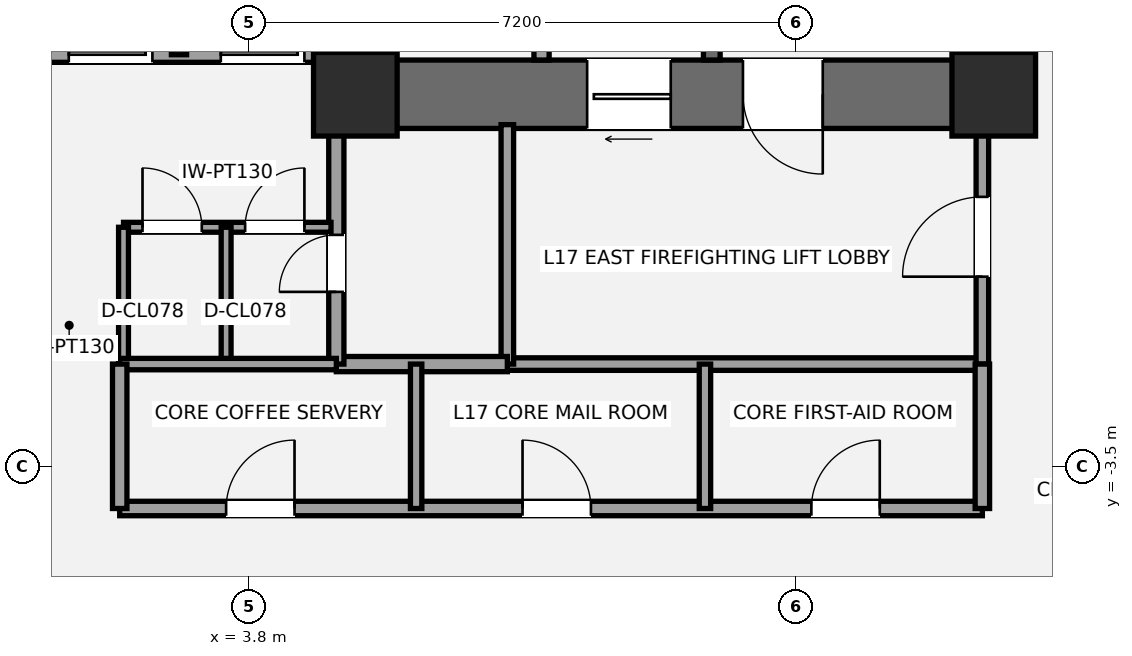
"""IFC4 building model, lengths in metres.
Left out: names, types, materials, properties, quantities, classifications, styles, units other than length and angle.
Written with IfcOpenShell. Run it as: python <this file> out.ifc"""

import sys

from ifc_helpers import new_model, si_unit, direction, frame, frame_2d, origin, origin_2d, place, context, subcontext, project, spatial, rectangle, extrude, element, fill, save


model = new_model("IFC4")
c1 = context("Model", 3, precision=1e-05, world=origin(), true_north=direction((0.0, 1.0)))
c2 = subcontext(c1, "Body", "Model", "MODEL_VIEW")
j1 = project(units=[si_unit("LENGTHUNIT", "METRE"), si_unit("PLANEANGLEUNIT", "RADIAN")], contexts=[c1])
p1 = place(None, origin())
s1 = spatial("IfcSite", under=j1, at=p1, CompositionType="ELEMENT")
p2 = place(p1, origin())
s2 = spatial("IfcBuilding", under=s1, at=p2, CompositionType="ELEMENT")
p3 = place(p2, frame((0.0, 0.0, 66.6)))
s3 = spatial("IfcBuildingStorey", under=s2, at=p3, CompositionType="ELEMENT", Elevation=66.6)
p4 = place(p3, frame((13.6, 0.95, 0.0), z_axis=(0.0, 0.0, 1.0), x_axis=(0.0, 1.0, 0.0)))
e1 = element("IfcWall", 1, at=p4, inside=s3, PredefinedType="SHEAR", context=c2, shape_type="SweptSolid", body=[
    extrude(rectangle(XDim=8.95, YDim=0.9, at=frame_2d((4.475, 0.0))), origin(), (0.0, 0.0, 1.0), 3.6),
])
p5 = place(p3, frame((14.05, 1.4, 0.0), z_axis=(0.0, 0.0, 1.0), x_axis=(-1.0, 0.0, 0.0)))
e2 = element("IfcWall", 2, at=p5, inside=s3, PredefinedType="SHEAR", context=c2, shape_type="SweptSolid", body=[
    extrude(rectangle(XDim=9.3, YDim=0.9, at=frame_2d((4.65, 0.0))), origin(), (0.0, 0.0, 1.0), 3.6),
])
p6 = place(p5, frame((2.7, 0.0, 0.0)))
e3 = element("IfcOpeningElement", 3, at=p6, cuts=e2, PredefinedType="OPENING", context=c2, shape_type="SweptSolid", body=[
    extrude(rectangle(XDim=1.05, YDim=2.15, at=frame_2d((0.525, 1.075))), frame((0.0, 0.46, 0.0), z_axis=(0.0, -1.0, 0.0), x_axis=(1.0, 0.0, 0.0)), (0.0, 0.0, 1.0), 0.92),
])
p7 = place(p5, frame((4.7, 0.0, 0.0)))
e4 = element("IfcOpeningElement", 4, at=p7, cuts=e2, PredefinedType="OPENING", context=c2, shape_type="SweptSolid", body=[
    extrude(rectangle(XDim=1.1, YDim=2.2, at=frame_2d((0.55, 1.1))), frame((0.0, 0.46, 0.0), z_axis=(0.0, -1.0, 0.0), x_axis=(1.0, 0.0, 0.0)), (0.0, 0.0, 1.0), 0.92),
])
p8 = place(p3, frame((5.2, 0.95, 0.0), z_axis=(0.0, 0.0, 1.0), x_axis=(0.0, 1.0, 0.0)))
e5 = element("IfcWall", 5, at=p8, inside=s3, PredefinedType="SHEAR", context=c2, shape_type="SweptSolid", body=[
    extrude(rectangle(XDim=2.85, YDim=0.9, at=frame_2d((1.425, 0.0))), origin(), (0.0, 0.0, 1.0), 3.6),
])
p9 = place(p3, frame((9.89, 1.85, 0.0), z_axis=(0.0, 0.0, 1.0), x_axis=(0.0, 1.0, 0.0)))
e6 = element("IfcWall", 6, at=p9, inside=s3, PredefinedType="SHEAR", context=c2, shape_type="SweptSolid", body=[
    extrude(rectangle(XDim=7.15, YDim=0.22, at=frame_2d((3.575, 0.0))), origin(), (0.0, 0.0, 1.0), 3.6),
])
for number, where, z_axis, x_axis in (
    (7, (5.2, 1.4, 0.0), (0.0, 0.0, 1.0), (1.0, 0.0, 0.0)),
    (8, (13.6, 1.4, 0.0), (0.0, 0.0, 1.0), (1.0, 0.0, 0.0)),
):
    element("IfcColumn", number, at=place(p3, frame(where, z_axis=z_axis, x_axis=x_axis)), inside=s3, PredefinedType="COLUMN", context=c2, shape_type="SweptSolid", body=[
        extrude(rectangle(XDim=1.1, YDim=1.1, at=origin_2d()), origin(), (0.0, 0.0, 1.0), 3.6),
    ])
p10 = place(p3, frame((7.2, -2.15, 0.0), z_axis=(0.0, 0.0, 1.0), x_axis=(1.0, 0.0, 0.0)))
e9 = element("IfcWall", 9, at=p10, inside=s3, PredefinedType="PARTITIONING", context=c2, shape_type="SweptSolid", body=[
    extrude(rectangle(XDim=6.25, YDim=0.165, at=frame_2d((3.125, 0.0))), origin(), (0.0, 0.0, 1.0), 3.4),
])
p11 = place(p3, frame((7.2, -2.15, 0.0), z_axis=(0.0, 0.0, 1.0), x_axis=(0.0, 1.0, 0.0)))
e10 = element("IfcWall", 10, at=p11, inside=s3, PredefinedType="PARTITIONING", context=c2, shape_type="SweptSolid", body=[
    extrude(rectangle(XDim=3.15, YDim=0.165, at=frame_2d((1.575, 0.0))), origin(), (0.0, 0.0, 1.0), 2.853),
])
p12 = place(p3, frame((13.45, -2.15, 0.0), z_axis=(0.0, 0.0, 1.0), x_axis=(0.0, 1.0, 0.0)))
e11 = element("IfcWall", 11, at=p12, inside=s3, PredefinedType="PARTITIONING", context=c2, shape_type="SweptSolid", body=[
    extrude(rectangle(XDim=3.15, YDim=0.165, at=frame_2d((1.575, 0.0))), origin(), (0.0, 0.0, 1.0), 2.853),
])
p13 = place(p12, frame((1.15, 0.0, 0.0)))
e12 = element("IfcOpeningElement", 12, at=p13, cuts=e11, PredefinedType="OPENING", context=c2, shape_type="SweptSolid", body=[
    extrude(rectangle(XDim=1.05, YDim=2.15, at=frame_2d((0.525, 1.075))), frame((0.0, 0.093, 0.0), z_axis=(0.0, -1.0, 0.0), x_axis=(1.0, 0.0, 0.0)), (0.0, 0.0, 1.0), 0.185),
])
p14 = place(p3, frame((4.95, -2.15, 0.0), z_axis=(0.0, 0.0, 1.0), x_axis=(1.0, 0.0, 0.0)))
e13 = element("IfcWall", 13, at=p14, inside=s3, PredefinedType="SOLIDWALL", context=c2, shape_type="SweptSolid", body=[
    extrude(rectangle(XDim=2.25, YDim=0.2, at=frame_2d((1.125, 0.0))), origin(), (0.0, 0.0, 1.0), 3.4),
])
p15 = place(p3, frame((4.95, -2.15, 0.0), z_axis=(0.0, 0.0, 1.0), x_axis=(0.0, 1.0, 0.0)))
e14 = element("IfcWall", 14, at=p15, inside=s3, PredefinedType="SOLIDWALL", context=c2, shape_type="SweptSolid", body=[
    extrude(rectangle(XDim=3.15, YDim=0.2, at=frame_2d((1.575, 0.0))), origin(), (0.0, 0.0, 1.0), 2.853),
])
p16 = place(p15, frame((0.95, 0.0, 0.0)))
e15 = element("IfcOpeningElement", 15, at=p16, cuts=e14, PredefinedType="OPENING", context=c2, shape_type="SweptSolid", body=[
    extrude(rectangle(XDim=0.75, YDim=2.1, at=frame_2d((0.375, 1.05))), frame((0.0, 0.11, 0.0), z_axis=(0.0, -1.0, 0.0), x_axis=(1.0, 0.0, 0.0)), (0.0, 0.0, 1.0), 0.22),
])
p17 = place(p3, frame((2.15, -0.35, 0.0), z_axis=(0.0, 0.0, 1.0), x_axis=(1.0, 0.0, 0.0)))
e16 = element("IfcWall", 16, at=p17, inside=s3, PredefinedType="PARTITIONING", context=c2, shape_type="SweptSolid", body=[
    extrude(rectangle(XDim=2.73, YDim=0.13, at=frame_2d((1.365, 0.0))), origin(), (0.0, 0.0, 1.0), 3.4),
])
p18 = place(p17, frame((0.25, 0.0, 0.0)))
e17 = element("IfcOpeningElement", 17, at=p18, cuts=e16, PredefinedType="OPENING", context=c2, shape_type="SweptSolid", body=[
    extrude(rectangle(XDim=0.78, YDim=2.1, at=frame_2d((0.39, 1.05))), frame((0.0, 0.075, 0.0), z_axis=(0.0, -1.0, 0.0), x_axis=(1.0, 0.0, 0.0)), (0.0, 0.0, 1.0), 0.15),
])
p19 = place(p17, frame((1.6, 0.0, 0.0)))
e18 = element("IfcOpeningElement", 18, at=p19, cuts=e16, PredefinedType="OPENING", context=c2, shape_type="SweptSolid", body=[
    extrude(rectangle(XDim=0.78, YDim=2.1, at=frame_2d((0.39, 1.05))), frame((0.0, 0.075, 0.0), z_axis=(0.0, -1.0, 0.0), x_axis=(1.0, 0.0, 0.0)), (0.0, 0.0, 1.0), 0.15),
])
for number, where, z_axis, x_axis in (
    (19, (2.15, -2.15, 0.0), (0.0, 0.0, 1.0), (0.0, 1.0, 0.0)),
    (20, (3.5, -2.15, 0.0), (0.0, 0.0, 1.0), (0.0, 1.0, 0.0)),
):
    element("IfcWall", number, at=place(p3, frame(where, z_axis=z_axis, x_axis=x_axis)), inside=s3, PredefinedType="PARTITIONING", context=c2, shape_type="SweptSolid", body=[
        extrude(rectangle(XDim=1.8, YDim=0.13, at=frame_2d((0.9, 0.0))), origin(), (0.0, 0.0, 1.0), 3.4),
    ])
p20 = place(p3, frame((7.65, 1.85, 0.0), z_axis=(0.0, 0.0, 1.0), x_axis=(0.0, 1.0, 0.0)))
e21 = element("IfcWall", 21, at=p20, inside=s3, PredefinedType="SOLIDWALL", context=c2, shape_type="SweptSolid", body=[
    extrude(rectangle(XDim=1.97, YDim=0.2, at=frame_2d((0.985, 0.0))), origin(), (0.0, 0.0, 1.0), 3.4),
])
p21 = place(p3, frame((0.88, 1.92, 0.0), z_axis=(0.0, 0.0, 1.0), x_axis=(1.0, 0.0, 0.0)))
e22 = element("IfcWall", 22, at=p21, inside=s3, PredefinedType="SOLIDWALL", context=c2, shape_type="SweptSolid", body=[
    extrude(rectangle(XDim=3.86, YDim=0.2, at=frame_2d((1.93, 0.0))), origin(), (0.0, 0.0, 1.0), 2.39),
])
p22 = place(p21, frame((0.55, 0.0, 0.0)))
e23 = element("IfcOpeningElement", 23, at=p22, cuts=e22, PredefinedType="OPENING", context=c2, shape_type="SweptSolid", body=[
    extrude(rectangle(XDim=1.1, YDim=2.2, at=frame_2d((0.55, 1.1))), frame((0.0, 0.11, 0.0), z_axis=(0.0, -1.0, 0.0), x_axis=(1.0, 0.0, 0.0)), (0.0, 0.0, 1.0), 0.22),
])
p23 = place(p21, frame((2.55, 0.0, 0.0)))
e24 = element("IfcOpeningElement", 24, at=p23, cuts=e22, PredefinedType="OPENING", context=c2, shape_type="SweptSolid", body=[
    extrude(rectangle(XDim=1.1, YDim=2.2, at=frame_2d((0.55, 1.1))), frame((0.0, 0.11, 0.0), z_axis=(0.0, -1.0, 0.0), x_axis=(1.0, 0.0, 0.0)), (0.0, 0.0, 1.0), 0.22),
])
p24 = place(p3, frame((2.88, 1.92, 0.0), z_axis=(0.0, 0.0, 1.0), x_axis=(0.0, 1.0, 0.0)))
e25 = element("IfcWall", 25, at=p24, inside=s3, PredefinedType="SOLIDWALL", context=c2, shape_type="SweptSolid", body=[
    extrude(rectangle(XDim=1.82, YDim=0.2, at=frame_2d((0.91, 0.0))), origin(), (0.0, 0.0, 1.0), 3.4),
])
p25 = place(p3, frame((2.1, -4.05, 0.0), z_axis=(0.0, 0.0, 1.0), x_axis=(1.0, 0.0, 0.0)))
e26 = element("IfcWall", 26, at=p25, inside=s3, PredefinedType="PLUMBINGWALL", context=c2, shape_type="SweptSolid", body=[
    extrude(rectangle(XDim=11.35, YDim=0.19, at=frame_2d((5.675, 0.0))), origin(), (0.0, 0.0, 1.0), 2.933),
])
p26 = place(p25, frame((1.4, 0.0, 0.0)))
e27 = element("IfcOpeningElement", 27, at=p26, cuts=e26, PredefinedType="OPENING", context=c2, shape_type="SweptSolid", body=[
    extrude(rectangle(XDim=0.9, YDim=2.1, at=frame_2d((0.45, 1.05))), frame((0.0, 0.105, 0.0), z_axis=(0.0, -1.0, 0.0), x_axis=(1.0, 0.0, 0.0)), (0.0, 0.0, 1.0), 0.21),
])
p27 = place(p25, frame((5.3, 0.0, 0.0)))
e28 = element("IfcOpeningElement", 28, at=p27, cuts=e26, PredefinedType="OPENING", context=c2, shape_type="SweptSolid", body=[
    extrude(rectangle(XDim=0.9, YDim=2.1, at=frame_2d((0.45, 1.05))), frame((0.0, 0.105, 0.0), z_axis=(0.0, -1.0, 0.0), x_axis=(1.0, 0.0, 0.0)), (0.0, 0.0, 1.0), 0.21),
])
p28 = place(p25, frame((9.1, 0.0, 0.0)))
e29 = element("IfcOpeningElement", 29, at=p28, cuts=e26, PredefinedType="OPENING", context=c2, shape_type="SweptSolid", body=[
    extrude(rectangle(XDim=0.9, YDim=2.1, at=frame_2d((0.45, 1.05))), frame((0.0, 0.105, 0.0), z_axis=(0.0, -1.0, 0.0), x_axis=(1.0, 0.0, 0.0)), (0.0, 0.0, 1.0), 0.21),
])
p29 = place(p3, frame((2.1, -2.15, 0.0), z_axis=(0.0, 0.0, 1.0), x_axis=(1.0, 0.0, 0.0)))
e30 = element("IfcWall", 30, at=p29, inside=s3, PredefinedType="PLUMBINGWALL", context=c2, shape_type="SweptSolid", body=[
    extrude(rectangle(XDim=2.85, YDim=0.15, at=frame_2d((1.425, 0.0))), origin(), (0.0, 0.0, 1.0), 3.4),
])
p30 = place(p3, frame((2.1, -4.05, 0.0), z_axis=(0.0, 0.0, 1.0), x_axis=(0.0, 1.0, 0.0)))
e31 = element("IfcWall", 31, at=p30, inside=s3, PredefinedType="PLUMBINGWALL", context=c2, shape_type="SweptSolid", body=[
    extrude(rectangle(XDim=1.9, YDim=0.19, at=frame_2d((0.95, 0.0))), origin(), (0.0, 0.0, 1.0), 3.4),
])
p31 = place(p3, frame((13.45, -4.05, 0.0), z_axis=(0.0, 0.0, 1.0), x_axis=(0.0, 1.0, 0.0)))
e32 = element("IfcWall", 32, at=p31, inside=s3, PredefinedType="PLUMBINGWALL", context=c2, shape_type="SweptSolid", body=[
    extrude(rectangle(XDim=1.9, YDim=0.19, at=frame_2d((0.95, 0.0))), origin(), (0.0, 0.0, 1.0), 2.853),
])
p32 = place(p3, frame((6.0, -4.05, 0.0), z_axis=(0.0, 0.0, 1.0), x_axis=(0.0, 1.0, 0.0)))
e33 = element("IfcWall", 33, at=p32, inside=s3, PredefinedType="PLUMBINGWALL", context=c2, shape_type="SweptSolid", body=[
    extrude(rectangle(XDim=1.9, YDim=0.15, at=frame_2d((0.95, 0.0))), origin(), (0.0, 0.0, 1.0), 2.841),
])
p33 = place(p3, frame((9.8, -4.05, 0.0), z_axis=(0.0, 0.0, 1.0), x_axis=(0.0, 1.0, 0.0)))
e34 = element("IfcWall", 34, at=p33, inside=s3, PredefinedType="PLUMBINGWALL", context=c2, shape_type="SweptSolid", body=[
    extrude(rectangle(XDim=1.9, YDim=0.15, at=frame_2d((0.95, 0.0))), origin(), (0.0, 0.0, 1.0), 3.4),
])
p34 = place(p6, origin())
e35 = element("IfcDoor", 35, at=p34, inside=s3, OperationType="SINGLE_SWING_LEFT", PredefinedType="DOOR", context=c2, shape_type="SweptSolid", body=[
    extrude(rectangle(XDim=1.05, YDim=2.15, at=frame_2d((0.525, 1.075))), frame((0.0, 0.025, 0.0), z_axis=(0.0, -1.0, 0.0), x_axis=(1.0, 0.0, 0.0)), (0.0, 0.0, 1.0), 0.05),
])
fill(e3, e35)
p35 = place(p13, origin())
e36 = element("IfcDoor", 36, at=p35, inside=s3, OperationType="SINGLE_SWING_LEFT", PredefinedType="DOOR", context=c2, shape_type="SweptSolid", body=[
    extrude(rectangle(XDim=1.05, YDim=2.15, at=frame_2d((0.525, 1.075))), frame((0.0, 0.025, 0.0), z_axis=(0.0, -1.0, 0.0), x_axis=(1.0, 0.0, 0.0)), (0.0, 0.0, 1.0), 0.05),
])
fill(e12, e36)
p36 = place(p16, origin())
e37 = element("IfcDoor", 37, at=p36, inside=s3, OperationType="SINGLE_SWING_LEFT", PredefinedType="DOOR", context=c2, shape_type="SweptSolid", body=[
    extrude(rectangle(XDim=0.75, YDim=2.1, at=frame_2d((0.375, 1.05))), frame((0.0, 0.025, 0.0), z_axis=(0.0, -1.0, 0.0), x_axis=(1.0, 0.0, 0.0)), (0.0, 0.0, 1.0), 0.05),
])
fill(e15, e37)
p37 = place(p18, origin())
e38 = element("IfcDoor", 38, at=p37, inside=s3, OperationType="SINGLE_SWING_LEFT", PredefinedType="DOOR", context=c2, shape_type="SweptSolid", body=[
    extrude(rectangle(XDim=0.78, YDim=2.1, at=frame_2d((0.39, 1.05))), frame((0.0, 0.025, 0.0), z_axis=(0.0, -1.0, 0.0), x_axis=(1.0, 0.0, 0.0)), (0.0, 0.0, 1.0), 0.05),
])
fill(e17, e38)
p38 = place(p19, origin())
e39 = element("IfcDoor", 39, at=p38, inside=s3, OperationType="SINGLE_SWING_RIGHT", PredefinedType="DOOR", context=c2, shape_type="SweptSolid", body=[
    extrude(rectangle(XDim=0.78, YDim=2.1, at=frame_2d((0.39, 1.05))), frame((0.0, 0.025, 0.0), z_axis=(0.0, -1.0, 0.0), x_axis=(1.0, 0.0, 0.0)), (0.0, 0.0, 1.0), 0.05),
])
fill(e18, e39)
p39 = place(p7, origin())
e40 = element("IfcDoor", 40, at=p39, inside=s3, OperationType="SLIDING_TO_LEFT", PredefinedType="DOOR", context=c2, shape_type="SweptSolid", body=[
    extrude(rectangle(XDim=1.1, YDim=2.2, at=frame_2d((0.55, 1.1))), frame((0.0, 0.025, 0.0), z_axis=(0.0, -1.0, 0.0), x_axis=(1.0, 0.0, 0.0)), (0.0, 0.0, 1.0), 0.05),
])
fill(e4, e40)
p40 = place(p22, origin())
e41 = element("IfcDoor", 41, at=p40, inside=s3, OperationType="SLIDING_TO_LEFT", PredefinedType="DOOR", context=c2, shape_type="SweptSolid", body=[
    extrude(rectangle(XDim=1.1, YDim=2.2, at=frame_2d((0.55, 1.1))), frame((0.0, 0.025, 0.0), z_axis=(0.0, -1.0, 0.0), x_axis=(1.0, 0.0, 0.0)), (0.0, 0.0, 1.0), 0.05),
])
fill(e23, e41)
p41 = place(p23, origin())
e42 = element("IfcDoor", 42, at=p41, inside=s3, OperationType="SLIDING_TO_LEFT", PredefinedType="DOOR", context=c2, shape_type="SweptSolid", body=[
    extrude(rectangle(XDim=1.1, YDim=2.2, at=frame_2d((0.55, 1.1))), frame((0.0, 0.025, 0.0), z_axis=(0.0, -1.0, 0.0), x_axis=(1.0, 0.0, 0.0)), (0.0, 0.0, 1.0), 0.05),
])
fill(e24, e42)
p42 = place(p26, origin())
e43 = element("IfcDoor", 43, at=p42, inside=s3, OperationType="SINGLE_SWING_RIGHT", PredefinedType="DOOR", context=c2, shape_type="SweptSolid", body=[
    extrude(rectangle(XDim=0.9, YDim=2.1, at=frame_2d((0.45, 1.05))), frame((0.0, 0.025, 0.0), z_axis=(0.0, -1.0, 0.0), x_axis=(1.0, 0.0, 0.0)), (0.0, 0.0, 1.0), 0.05),
])
fill(e27, e43)
p43 = place(p27, origin())
e44 = element("IfcDoor", 44, at=p43, inside=s3, OperationType="SINGLE_SWING_LEFT", PredefinedType="DOOR", context=c2, shape_type="SweptSolid", body=[
    extrude(rectangle(XDim=0.9, YDim=2.1, at=frame_2d((0.45, 1.05))), frame((0.0, 0.025, 0.0), z_axis=(0.0, -1.0, 0.0), x_axis=(1.0, 0.0, 0.0)), (0.0, 0.0, 1.0), 0.05),
])
fill(e28, e44)
p44 = place(p28, origin())
e45 = element("IfcDoor", 45, at=p44, inside=s3, OperationType="SINGLE_SWING_RIGHT", PredefinedType="DOOR", context=c2, shape_type="SweptSolid", body=[
    extrude(rectangle(XDim=0.9, YDim=2.1, at=frame_2d((0.45, 1.05))), frame((0.0, 0.025, 0.0), z_axis=(0.0, -1.0, 0.0), x_axis=(1.0, 0.0, 0.0)), (0.0, 0.0, 1.0), 0.05),
])
fill(e29, e45)
save(model, sys.argv[1])
